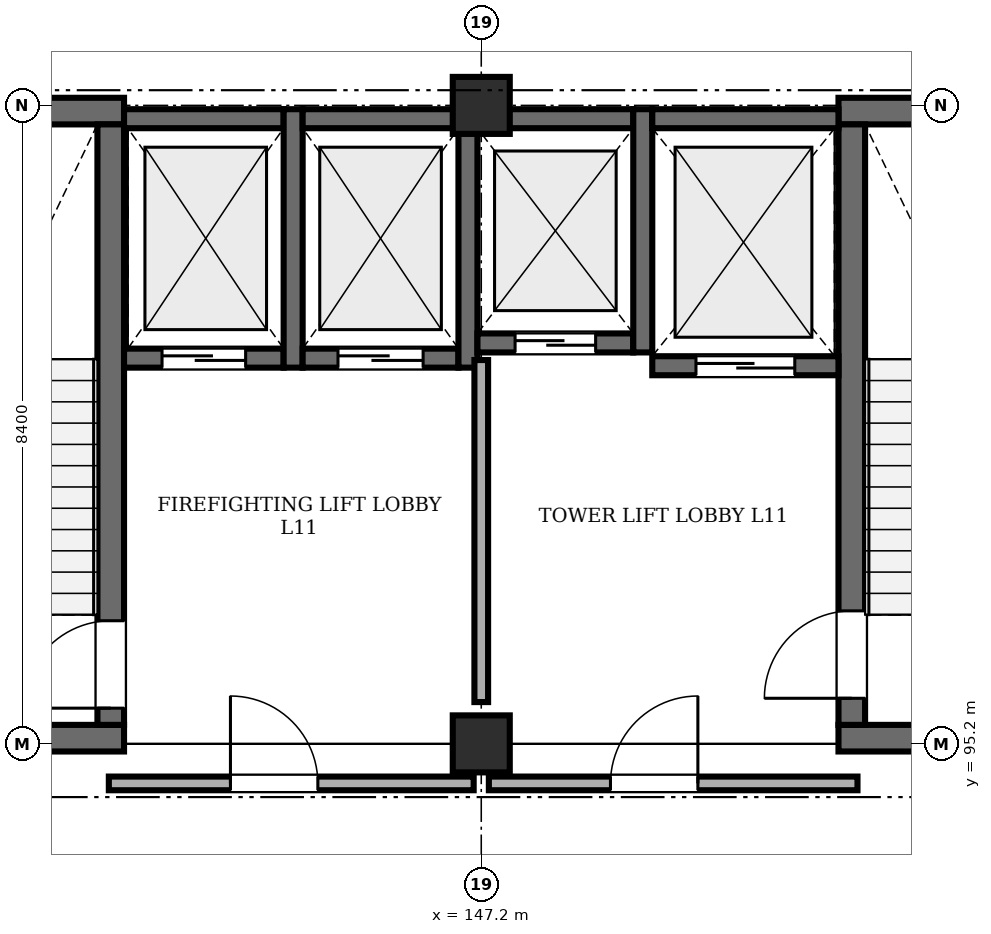
"""IFC4 building model, lengths in metres.
Left out: names, types, materials, properties, quantities, classifications, styles, units other than length and angle.
Written with IfcOpenShell. Run it as: python <this file> out.ifc"""

import sys

from ifc_helpers import new_model, si_unit, direction, frame, frame_2d, origin, origin_2d, place, context, subcontext, project, spatial, rectangle, extrude, element, fill, save


model = new_model("IFC4")
c1 = context("Model", 3, precision=1e-05, world=origin(), true_north=direction((0.0, 1.0)))
c2 = subcontext(c1, "Body", "Model", "MODEL_VIEW")
j1 = project(units=[si_unit("LENGTHUNIT", "METRE"), si_unit("PLANEANGLEUNIT", "RADIAN")], contexts=[c1])
p1 = place(None, origin())
s1 = spatial("IfcSite", under=j1, at=p1, CompositionType="ELEMENT")
p2 = place(p1, origin())
s2 = spatial("IfcBuilding", under=s1, at=p2, CompositionType="ELEMENT")
p3 = place(p2, frame((0.0, 0.0, 44.4)))
s3 = spatial("IfcBuildingStorey", under=s2, at=p3, CompositionType="ELEMENT", Elevation=44.4)
for number, where, z_axis, x_axis in (
    (1, (147.2, 95.2, 0.0), (0.0, 0.0, 1.0), (1.0, 0.0, 0.0)),
    (2, (147.2, 103.6, 0.0), (0.0, 0.0, 1.0), (1.0, 0.0, 0.0)),
):
    element("IfcColumn", number, at=place(p3, frame(where, z_axis=z_axis, x_axis=x_axis)), inside=s3, PredefinedType="COLUMN", context=c2, shape_type="SweptSolid", body=[
        extrude(rectangle(XDim=0.75, YDim=0.75, at=origin_2d()), origin(), (0.0, 0.0, 1.0), 4.01),
    ])
for number, where, z_axis, x_axis in (
    (3, (138.7, 95.275, 0.0), (0.0, 0.0, 1.0), (1.0, 0.0, 0.0)),
    (4, (138.7, 103.525, 0.0), (0.0, 0.0, 1.0), (1.0, 0.0, 0.0)),
):
    element("IfcWall", number, at=place(p3, frame(where, z_axis=z_axis, x_axis=x_axis)), inside=s3, PredefinedType="SHEAR", context=c2, shape_type="SweptSolid", body=[
        extrude(rectangle(XDim=3.8, YDim=0.35, at=frame_2d((1.9, 0.0))), origin(), (0.0, 0.0, 1.0), 4.01),
    ])
p4 = place(p3, frame((142.325, 95.45, 0.0), z_axis=(0.0, 0.0, 1.0), x_axis=(0.0, 1.0, 0.0)))
e5 = element("IfcWall", 5, at=p4, inside=s3, PredefinedType="SHEAR", context=c2, shape_type="SweptSolid", body=[
    extrude(rectangle(XDim=7.9, YDim=0.35, at=frame_2d((3.95, 0.0))), origin(), (0.0, 0.0, 1.0), 4.01),
])
p5 = place(p4, frame((0.22, 0.0, 0.0)))
e6 = element("IfcOpeningElement", 6, at=p5, cuts=e5, PredefinedType="OPENING", context=c2, shape_type="SweptSolid", body=[
    extrude(rectangle(XDim=1.15, YDim=2.15, at=frame_2d((0.575, 1.075))), frame((0.0, 0.185, 0.0), z_axis=(0.0, -1.0, 0.0), x_axis=(1.0, 0.0, 0.0)), (0.0, 0.0, 1.0), 0.37),
])
for number, where, z_axis, x_axis in (
    (7, (151.9, 95.275, 0.0), (0.0, 0.0, 1.0), (1.0, 0.0, 0.0)),
    (8, (151.9, 103.525, 0.0), (0.0, 0.0, 1.0), (1.0, 0.0, 0.0)),
):
    element("IfcWall", number, at=place(p3, frame(where, z_axis=z_axis, x_axis=x_axis)), inside=s3, PredefinedType="SHEAR", context=c2, shape_type="SweptSolid", body=[
        extrude(rectangle(XDim=3.8, YDim=0.35, at=frame_2d((1.9, 0.0))), origin(), (0.0, 0.0, 1.0), 4.01),
    ])
p6 = place(p3, frame((152.075, 95.45, 0.0), z_axis=(0.0, 0.0, 1.0), x_axis=(0.0, 1.0, 0.0)))
e9 = element("IfcWall", 9, at=p6, inside=s3, PredefinedType="SHEAR", context=c2, shape_type="SweptSolid", body=[
    extrude(rectangle(XDim=7.9, YDim=0.35, at=frame_2d((3.95, 0.0))), origin(), (0.0, 0.0, 1.0), 4.01),
])
p7 = place(p6, frame((0.35, 0.0, 0.0)))
e10 = element("IfcOpeningElement", 10, at=p7, cuts=e9, PredefinedType="OPENING", context=c2, shape_type="SweptSolid", body=[
    extrude(rectangle(XDim=1.15, YDim=2.15, at=frame_2d((0.575, 1.075))), frame((0.0, 0.185, 0.0), z_axis=(0.0, -1.0, 0.0), x_axis=(1.0, 0.0, 0.0)), (0.0, 0.0, 1.0), 0.37),
])
p8 = place(p3, frame((142.5, 100.275, 0.0), z_axis=(0.0, 0.0, 1.0), x_axis=(1.0, 0.0, 0.0)))
e11 = element("IfcWall", 11, at=p8, inside=s3, PredefinedType="SHEAR", context=c2, shape_type="SweptSolid", body=[
    extrude(rectangle(XDim=2.1, YDim=0.25, at=frame_2d((1.05, 0.0))), origin(), (0.0, 0.0, 1.0), 4.01),
])
p9 = place(p8, frame((0.5, 0.0, 0.0)))
e12 = element("IfcOpeningElement", 12, at=p9, cuts=e11, PredefinedType="OPENING", context=c2, shape_type="SweptSolid", body=[
    extrude(rectangle(XDim=1.1, YDim=2.15, at=frame_2d((0.55, 1.075))), frame((0.0, 0.135, 0.0), z_axis=(0.0, -1.0, 0.0), x_axis=(1.0, 0.0, 0.0)), (0.0, 0.0, 1.0), 0.27),
])
p10 = place(p3, frame((142.5, 103.425, 0.0), z_axis=(0.0, 0.0, 1.0), x_axis=(1.0, 0.0, 0.0)))
e13 = element("IfcWall", 13, at=p10, inside=s3, PredefinedType="SHEAR", context=c2, shape_type="SweptSolid", body=[
    extrude(rectangle(XDim=2.1, YDim=0.25, at=frame_2d((1.05, 0.0))), origin(), (0.0, 0.0, 1.0), 4.01),
])
p11 = place(p3, frame((144.725, 100.15, 0.0), z_axis=(0.0, 0.0, 1.0), x_axis=(0.0, 1.0, 0.0)))
e14 = element("IfcWall", 14, at=p11, inside=s3, PredefinedType="SHEAR", context=c2, shape_type="SweptSolid", body=[
    extrude(rectangle(XDim=3.4, YDim=0.25, at=frame_2d((1.7, 0.0))), origin(), (0.0, 0.0, 1.0), 4.01),
])
p12 = place(p3, frame((144.85, 100.275, 0.0), z_axis=(0.0, 0.0, 1.0), x_axis=(1.0, 0.0, 0.0)))
e15 = element("IfcWall", 15, at=p12, inside=s3, PredefinedType="SHEAR", context=c2, shape_type="SweptSolid", body=[
    extrude(rectangle(XDim=2.05, YDim=0.25, at=frame_2d((1.025, 0.0))), origin(), (0.0, 0.0, 1.0), 4.01),
])
p13 = place(p12, frame((0.465, 0.0, 0.0)))
e16 = element("IfcOpeningElement", 16, at=p13, cuts=e15, PredefinedType="OPENING", context=c2, shape_type="SweptSolid", body=[
    extrude(rectangle(XDim=1.12, YDim=2.15, at=frame_2d((0.56, 1.075))), frame((0.0, 0.135, 0.0), z_axis=(0.0, -1.0, 0.0), x_axis=(1.0, 0.0, 0.0)), (0.0, 0.0, 1.0), 0.27),
])
p14 = place(p3, frame((144.85, 103.425, 0.0), z_axis=(0.0, 0.0, 1.0), x_axis=(1.0, 0.0, 0.0)))
e17 = element("IfcWall", 17, at=p14, inside=s3, PredefinedType="SHEAR", context=c2, shape_type="SweptSolid", body=[
    extrude(rectangle(XDim=2.05, YDim=0.25, at=frame_2d((1.025, 0.0))), origin(), (0.0, 0.0, 1.0), 4.01),
])
p15 = place(p3, frame((147.025, 100.15, 0.0), z_axis=(0.0, 0.0, 1.0), x_axis=(0.0, 1.0, 0.0)))
e18 = element("IfcWall", 18, at=p15, inside=s3, PredefinedType="SHEAR", context=c2, shape_type="SweptSolid", body=[
    extrude(rectangle(XDim=3.4, YDim=0.25, at=frame_2d((1.7, 0.0))), origin(), (0.0, 0.0, 1.0), 4.01),
])
p16 = place(p3, frame((147.15, 100.475, 0.0), z_axis=(0.0, 0.0, 1.0), x_axis=(1.0, 0.0, 0.0)))
e19 = element("IfcWall", 19, at=p16, inside=s3, PredefinedType="SHEAR", context=c2, shape_type="SweptSolid", body=[
    extrude(rectangle(XDim=2.05, YDim=0.25, at=frame_2d((1.025, 0.0))), origin(), (0.0, 0.0, 1.0), 4.01),
])
p17 = place(p16, frame((0.495, 0.0, 0.0)))
e20 = element("IfcOpeningElement", 20, at=p17, cuts=e19, PredefinedType="OPENING", context=c2, shape_type="SweptSolid", body=[
    extrude(rectangle(XDim=1.06, YDim=2.15, at=frame_2d((0.53, 1.075))), frame((0.0, 0.135, 0.0), z_axis=(0.0, -1.0, 0.0), x_axis=(1.0, 0.0, 0.0)), (0.0, 0.0, 1.0), 0.27),
])
p18 = place(p3, frame((147.15, 103.425, 0.0), z_axis=(0.0, 0.0, 1.0), x_axis=(1.0, 0.0, 0.0)))
e21 = element("IfcWall", 21, at=p18, inside=s3, PredefinedType="SHEAR", context=c2, shape_type="SweptSolid", body=[
    extrude(rectangle(XDim=2.05, YDim=0.25, at=frame_2d((1.025, 0.0))), origin(), (0.0, 0.0, 1.0), 4.01),
])
p19 = place(p3, frame((149.325, 100.35, 0.0), z_axis=(0.0, 0.0, 1.0), x_axis=(0.0, 1.0, 0.0)))
e22 = element("IfcWall", 22, at=p19, inside=s3, PredefinedType="SHEAR", context=c2, shape_type="SweptSolid", body=[
    extrude(rectangle(XDim=3.2, YDim=0.25, at=frame_2d((1.6, 0.0))), origin(), (0.0, 0.0, 1.0), 4.01),
])
p20 = place(p3, frame((149.45, 100.175, 0.0), z_axis=(0.0, 0.0, 1.0), x_axis=(1.0, 0.0, 0.0)))
e23 = element("IfcWall", 23, at=p20, inside=s3, PredefinedType="SHEAR", context=c2, shape_type="SweptSolid", body=[
    extrude(rectangle(XDim=2.45, YDim=0.25, at=frame_2d((1.225, 0.0))), origin(), (0.0, 0.0, 1.0), 4.01),
])
p21 = place(p20, frame((0.575, 0.0, 0.0)))
e24 = element("IfcOpeningElement", 24, at=p21, cuts=e23, PredefinedType="OPENING", context=c2, shape_type="SweptSolid", body=[
    extrude(rectangle(XDim=1.3, YDim=2.25, at=frame_2d((0.65, 1.125))), frame((0.0, 0.135, 0.0), z_axis=(0.0, -1.0, 0.0), x_axis=(1.0, 0.0, 0.0)), (0.0, 0.0, 1.0), 0.27),
])
p22 = place(p3, frame((149.45, 103.425, 0.0), z_axis=(0.0, 0.0, 1.0), x_axis=(1.0, 0.0, 0.0)))
e25 = element("IfcWall", 25, at=p22, inside=s3, PredefinedType="SHEAR", context=c2, shape_type="SweptSolid", body=[
    extrude(rectangle(XDim=2.45, YDim=0.25, at=frame_2d((1.225, 0.0))), origin(), (0.0, 0.0, 1.0), 4.01),
])
p23 = place(p3, frame((142.3, 94.68, 0.0), z_axis=(0.0, 0.0, 1.0), x_axis=(1.0, 0.0, 0.0)))
e26 = element("IfcWall", 26, at=p23, inside=s3, PredefinedType="STANDARD", context=c2, shape_type="SweptSolid", body=[
    extrude(rectangle(XDim=4.8, YDim=0.18, at=frame_2d((2.4, 0.0))), origin(), (0.0, 0.0, 1.0), 4.01),
])
p24 = place(p23, frame((1.6, 0.0, 0.0)))
e27 = element("IfcOpeningElement", 27, at=p24, cuts=e26, PredefinedType="OPENING", context=c2, shape_type="SweptSolid", body=[
    extrude(rectangle(XDim=1.15, YDim=2.15, at=frame_2d((0.575, 1.075))), frame((0.0, 0.1, 0.0), z_axis=(0.0, -1.0, 0.0), x_axis=(1.0, 0.0, 0.0)), (0.0, 0.0, 1.0), 0.2),
])
p25 = place(p3, frame((147.3, 94.68, 0.0), z_axis=(0.0, 0.0, 1.0), x_axis=(1.0, 0.0, 0.0)))
e28 = element("IfcWall", 28, at=p25, inside=s3, PredefinedType="STANDARD", context=c2, shape_type="SweptSolid", body=[
    extrude(rectangle(XDim=4.85, YDim=0.18, at=frame_2d((2.425, 0.0))), origin(), (0.0, 0.0, 1.0), 4.01),
])
p26 = place(p25, frame((1.6, 0.0, 0.0)))
e29 = element("IfcOpeningElement", 29, at=p26, cuts=e28, PredefinedType="OPENING", context=c2, shape_type="SweptSolid", body=[
    extrude(rectangle(XDim=1.15, YDim=2.15, at=frame_2d((0.575, 1.075))), frame((0.0, 0.1, 0.0), z_axis=(0.0, -1.0, 0.0), x_axis=(1.0, 0.0, 0.0)), (0.0, 0.0, 1.0), 0.2),
])
p27 = place(p3, frame((147.2, 95.75, 0.0), z_axis=(0.0, 0.0, 1.0), x_axis=(0.0, 1.0, 0.0)))
e30 = element("IfcWall", 30, at=p27, inside=s3, PredefinedType="STANDARD", context=c2, shape_type="SweptSolid", body=[
    extrude(rectangle(XDim=4.5, YDim=0.18, at=frame_2d((2.25, 0.0))), origin(), (0.0, 0.0, 1.0), 3.31),
])
p28 = place(p24, origin())
e31 = element("IfcDoor", 31, at=p28, inside=s3, OperationType="SINGLE_SWING_LEFT", PredefinedType="DOOR", context=c2, shape_type="SweptSolid", body=[
    extrude(rectangle(XDim=1.15, YDim=2.15, at=frame_2d((0.575, 1.075))), frame((0.0, 0.025, 0.0), z_axis=(0.0, -1.0, 0.0), x_axis=(1.0, 0.0, 0.0)), (0.0, 0.0, 1.0), 0.05),
])
fill(e27, e31)
p29 = place(p26, origin())
e32 = element("IfcDoor", 32, at=p29, inside=s3, OperationType="SINGLE_SWING_RIGHT", PredefinedType="DOOR", context=c2, shape_type="SweptSolid", body=[
    extrude(rectangle(XDim=1.15, YDim=2.15, at=frame_2d((0.575, 1.075))), frame((0.0, 0.025, 0.0), z_axis=(0.0, -1.0, 0.0), x_axis=(1.0, 0.0, 0.0)), (0.0, 0.0, 1.0), 0.05),
])
fill(e29, e32)
p30 = place(p5, origin())
e33 = element("IfcDoor", 33, at=p30, inside=s3, OperationType="SINGLE_SWING_LEFT", PredefinedType="DOOR", context=c2, shape_type="SweptSolid", body=[
    extrude(rectangle(XDim=1.15, YDim=2.15, at=frame_2d((0.575, 1.075))), frame((0.0, 0.025, 0.0), z_axis=(0.0, -1.0, 0.0), x_axis=(1.0, 0.0, 0.0)), (0.0, 0.0, 1.0), 0.05),
])
fill(e6, e33)
p31 = place(p7, origin())
e34 = element("IfcDoor", 34, at=p31, inside=s3, OperationType="SINGLE_SWING_LEFT", PredefinedType="DOOR", context=c2, shape_type="SweptSolid", body=[
    extrude(rectangle(XDim=1.15, YDim=2.15, at=frame_2d((0.575, 1.075))), frame((0.0, 0.025, 0.0), z_axis=(0.0, -1.0, 0.0), x_axis=(1.0, 0.0, 0.0)), (0.0, 0.0, 1.0), 0.05),
])
fill(e10, e34)
p32 = place(p9, origin())
e35 = element("IfcDoor", 35, at=p32, inside=s3, OperationType="SLIDING_TO_LEFT", PredefinedType="DOOR", context=c2, shape_type="SweptSolid", body=[
    extrude(rectangle(XDim=1.1, YDim=2.15, at=frame_2d((0.55, 1.075))), frame((0.0, 0.025, 0.0), z_axis=(0.0, -1.0, 0.0), x_axis=(1.0, 0.0, 0.0)), (0.0, 0.0, 1.0), 0.05),
])
fill(e12, e35)
p33 = place(p13, origin())
e36 = element("IfcDoor", 36, at=p33, inside=s3, OperationType="SLIDING_TO_LEFT", PredefinedType="DOOR", context=c2, shape_type="SweptSolid", body=[
    extrude(rectangle(XDim=1.12, YDim=2.15, at=frame_2d((0.56, 1.075))), frame((0.0, 0.025, 0.0), z_axis=(0.0, -1.0, 0.0), x_axis=(1.0, 0.0, 0.0)), (0.0, 0.0, 1.0), 0.05),
])
fill(e16, e36)
p34 = place(p17, origin())
e37 = element("IfcDoor", 37, at=p34, inside=s3, OperationType="SLIDING_TO_LEFT", PredefinedType="DOOR", context=c2, shape_type="SweptSolid", body=[
    extrude(rectangle(XDim=1.06, YDim=2.15, at=frame_2d((0.53, 1.075))), frame((0.0, 0.025, 0.0), z_axis=(0.0, -1.0, 0.0), x_axis=(1.0, 0.0, 0.0)), (0.0, 0.0, 1.0), 0.05),
])
fill(e20, e37)
p35 = place(p21, origin())
e38 = element("IfcDoor", 38, at=p35, inside=s3, OperationType="SLIDING_TO_LEFT", PredefinedType="DOOR", context=c2, shape_type="SweptSolid", body=[
    extrude(rectangle(XDim=1.3, YDim=2.25, at=frame_2d((0.65, 1.125))), frame((0.0, 0.025, 0.0), z_axis=(0.0, -1.0, 0.0), x_axis=(1.0, 0.0, 0.0)), (0.0, 0.0, 1.0), 0.05),
])
fill(e24, e38)
save(model, sys.argv[1])
